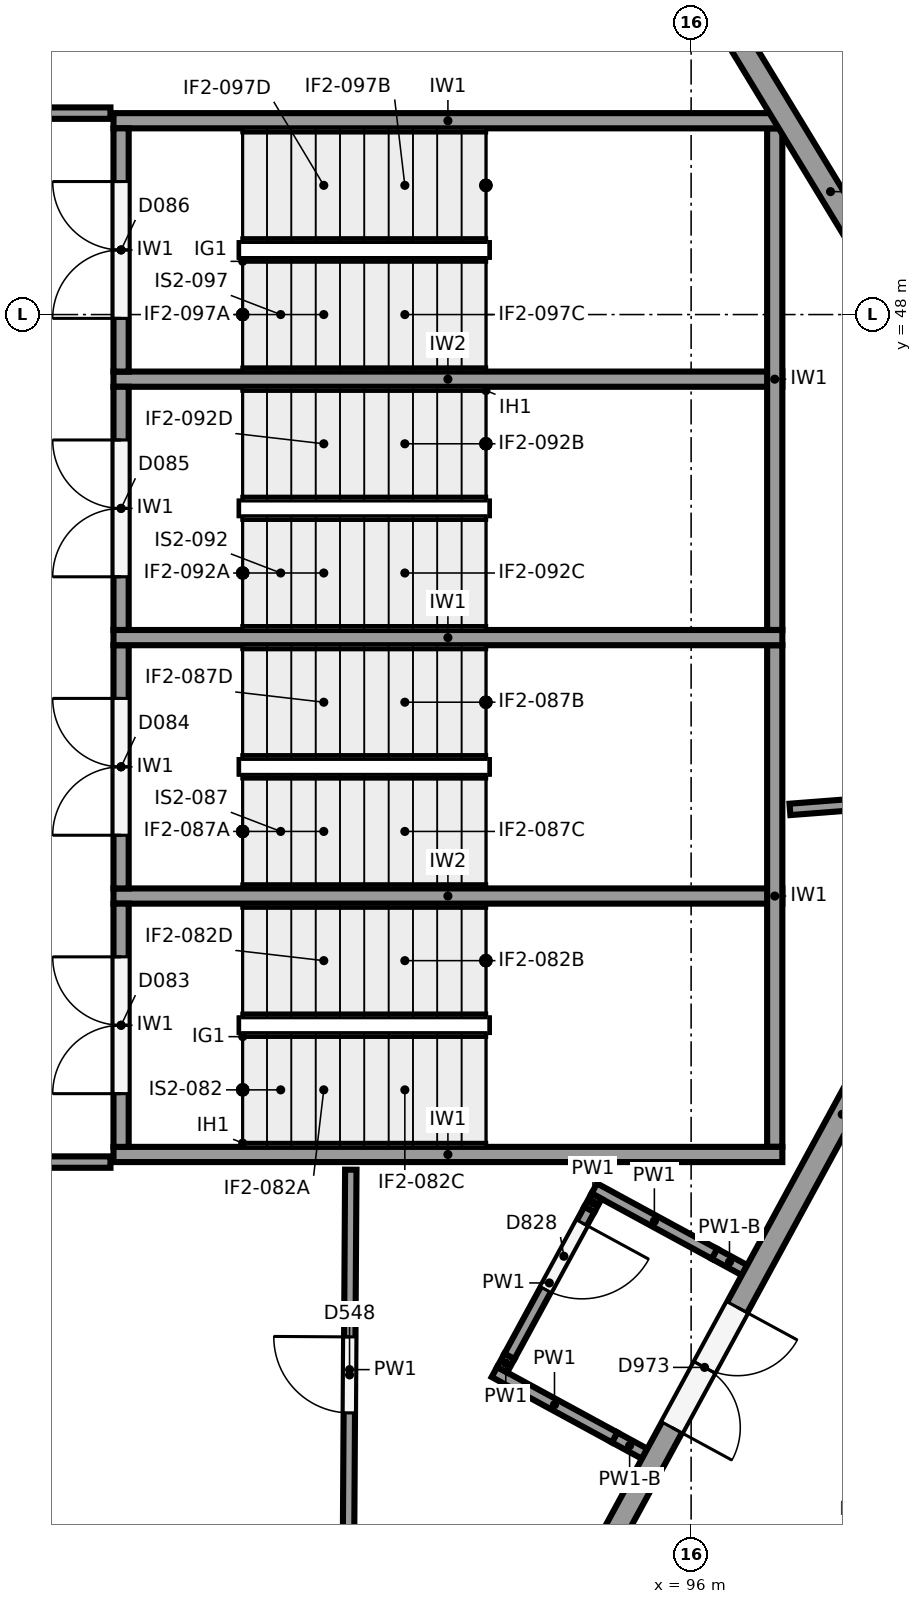
"""IFC4 building model, lengths in metres.
Left out: names, types, materials, properties, quantities, classifications, styles, units other than length and angle.
Written with IfcOpenShell. Run it as: python <this file> out.ifc"""

import sys

from ifc_helpers import new_model, si_unit, direction, frame, frame_2d, origin, place, context, subcontext, project, spatial, rectangle, extrude, element, fill, save


model = new_model("IFC4")
c1 = context("Model", 3, precision=1e-05, world=origin(), true_north=direction((0.0, 1.0)))
c2 = subcontext(c1, "Body", "Model", "MODEL_VIEW")
j1 = project(units=[si_unit("LENGTHUNIT", "METRE"), si_unit("PLANEANGLEUNIT", "RADIAN")], contexts=[c1])
p1 = place(None, origin())
s1 = spatial("IfcSite", under=j1, at=p1, CompositionType="ELEMENT")
p2 = place(p1, origin())
s2 = spatial("IfcBuilding", under=s1, at=p2, CompositionType="ELEMENT")
p3 = place(p2, origin())
s3 = spatial("IfcBuildingStorey", under=s2, at=p3, CompositionType="ELEMENT", Elevation=0.0)
p4 = place(p3, frame((101.161, 43.311, 0.0), z_axis=(0.0, 0.0, 1.0), x_axis=(-0.477867771117, -0.878431780691, 0.0)))
e1 = element("IfcWall", 1, at=p4, inside=s3, PredefinedType="SOLIDWALL", context=c2, shape_type="SweptSolid", body=[
    extrude(rectangle(XDim=13.28, YDim=0.3, at=frame_2d((6.64, 0.0))), origin(), (0.0, 0.0, 1.0), 4.85),
])
p5 = place(p4, frame((9.53, 0.0, 0.0)))
e2 = element("IfcOpeningElement", 2, at=p5, cuts=e1, PredefinedType="OPENING", context=c2, shape_type="SweptSolid", body=[
    extrude(rectangle(XDim=1.8, YDim=2.4, at=frame_2d((0.9, 1.2))), frame((0.0, 0.16, 0.0), z_axis=(0.0, -1.0, 0.0), x_axis=(1.0, 0.0, 0.0)), (0.0, 0.0, 1.0), 0.32),
])
p6 = place(p3, frame((94.528, 55.057, 0.0), z_axis=(0.0, 0.0, 1.0), x_axis=(0.519362860044, -0.854553813172, 0.0)))
e3 = element("IfcWall", 3, at=p6, inside=s3, PredefinedType="SOLIDWALL", context=c2, shape_type="SweptSolid", body=[
    extrude(rectangle(XDim=12.732, YDim=0.3, at=frame_2d((6.366, 0.0))), origin(), (0.0, 0.0, 1.0), 4.85),
])
for number, where, z_axis, x_axis in (
    (4, (97.2, 36.95, 0.0), (0.0, 0.0, 1.0), (-1.0, 0.0, 0.0)),
    (5, (97.2, 43.75, 0.0), (0.0, 0.0, 1.0), (-1.0, 0.0, 0.0)),
    (6, (97.2, 50.55, 0.0), (0.0, 0.0, 1.0), (-1.0, 0.0, 0.0)),
):
    element("IfcWall", number, at=place(p3, frame(where, z_axis=z_axis, x_axis=x_axis)), inside=s3, PredefinedType="SHEAR", context=c2, shape_type="SweptSolid", body=[
        extrude(rectangle(XDim=8.8, YDim=0.2, at=frame_2d((4.4, 0.0))), origin(), (0.0, 0.0, 1.0), 6.15),
    ])
for number, where, z_axis, x_axis in (
    (7, (97.1, 37.05, 0.0), (0.0, 0.0, 1.0), (0.0, 1.0, 0.0)),
    (8, (97.1, 43.85, 0.0), (0.0, 0.0, 1.0), (0.0, 1.0, 0.0)),
):
    element("IfcWall", number, at=place(p3, frame(where, z_axis=z_axis, x_axis=x_axis)), inside=s3, PredefinedType="SHEAR", context=c2, shape_type="SweptSolid", body=[
        extrude(rectangle(XDim=6.6, YDim=0.2, at=frame_2d((3.3, 0.0))), origin(), (0.0, 0.0, 1.0), 6.15),
    ])
for number, where, z_axis, x_axis in (
    (9, (97.2, 40.35, 0.0), (0.0, 0.0, 1.0), (-1.0, 0.0, 0.0)),
    (10, (97.2, 47.15, 0.0), (0.0, 0.0, 1.0), (-1.0, 0.0, 0.0)),
):
    element("IfcWall", number, at=place(p3, frame(where, z_axis=z_axis, x_axis=x_axis)), inside=s3, PredefinedType="SHEAR", context=c2, shape_type="SweptSolid", body=[
        extrude(rectangle(XDim=8.8, YDim=0.2, at=frame_2d((4.4, 0.0))), origin(), (0.0, 0.0, 1.0), 6.15),
    ])
p7 = place(p3, frame((88.5, 37.05, 0.0), z_axis=(0.0, 0.0, 1.0), x_axis=(0.0, 1.0, 0.0)))
e11 = element("IfcWall", 11, at=p7, inside=s3, PredefinedType="SHEAR", context=c2, shape_type="SweptSolid", body=[
    extrude(rectangle(XDim=3.2, YDim=0.2, at=frame_2d((1.6, 0.0))), origin(), (0.0, 0.0, 1.0), 6.15),
])
p8 = place(p7, frame((0.7, 0.0, 0.0)))
e12 = element("IfcOpeningElement", 12, at=p8, cuts=e11, PredefinedType="OPENING", context=c2, shape_type="SweptSolid", body=[
    extrude(rectangle(XDim=1.8, YDim=2.1, at=frame_2d((0.9, 1.05))), frame((0.0, 0.11, 0.0), z_axis=(0.0, -1.0, 0.0), x_axis=(1.0, 0.0, 0.0)), (0.0, 0.0, 1.0), 0.22),
])
p9 = place(p3, frame((88.5, 40.45, 0.0), z_axis=(0.0, 0.0, 1.0), x_axis=(0.0, 1.0, 0.0)))
e13 = element("IfcWall", 13, at=p9, inside=s3, PredefinedType="SHEAR", context=c2, shape_type="SweptSolid", body=[
    extrude(rectangle(XDim=3.2, YDim=0.2, at=frame_2d((1.6, 0.0))), origin(), (0.0, 0.0, 1.0), 6.15),
])
p10 = place(p9, frame((0.7, 0.0, 0.0)))
e14 = element("IfcOpeningElement", 14, at=p10, cuts=e13, PredefinedType="OPENING", context=c2, shape_type="SweptSolid", body=[
    extrude(rectangle(XDim=1.8, YDim=2.1, at=frame_2d((0.9, 1.05))), frame((0.0, 0.11, 0.0), z_axis=(0.0, -1.0, 0.0), x_axis=(1.0, 0.0, 0.0)), (0.0, 0.0, 1.0), 0.22),
])
p11 = place(p3, frame((88.5, 43.85, 0.0), z_axis=(0.0, 0.0, 1.0), x_axis=(0.0, 1.0, 0.0)))
e15 = element("IfcWall", 15, at=p11, inside=s3, PredefinedType="SHEAR", context=c2, shape_type="SweptSolid", body=[
    extrude(rectangle(XDim=3.2, YDim=0.2, at=frame_2d((1.6, 0.0))), origin(), (0.0, 0.0, 1.0), 6.15),
])
p12 = place(p11, frame((0.7, 0.0, 0.0)))
e16 = element("IfcOpeningElement", 16, at=p12, cuts=e15, PredefinedType="OPENING", context=c2, shape_type="SweptSolid", body=[
    extrude(rectangle(XDim=1.8, YDim=2.1, at=frame_2d((0.9, 1.05))), frame((0.0, 0.11, 0.0), z_axis=(0.0, -1.0, 0.0), x_axis=(1.0, 0.0, 0.0)), (0.0, 0.0, 1.0), 0.22),
])
p13 = place(p3, frame((88.5, 47.25, 0.0), z_axis=(0.0, 0.0, 1.0), x_axis=(0.0, 1.0, 0.0)))
e17 = element("IfcWall", 17, at=p13, inside=s3, PredefinedType="SHEAR", context=c2, shape_type="SweptSolid", body=[
    extrude(rectangle(XDim=3.2, YDim=0.2, at=frame_2d((1.6, 0.0))), origin(), (0.0, 0.0, 1.0), 6.15),
])
p14 = place(p13, frame((0.7, 0.0, 0.0)))
e18 = element("IfcOpeningElement", 18, at=p14, cuts=e17, PredefinedType="OPENING", context=c2, shape_type="SweptSolid", body=[
    extrude(rectangle(XDim=1.8, YDim=2.1, at=frame_2d((0.9, 1.05))), frame((0.0, 0.11, 0.0), z_axis=(0.0, -1.0, 0.0), x_axis=(1.0, 0.0, 0.0)), (0.0, 0.0, 1.0), 0.22),
])
p15 = place(p3, frame((85.377, 36.85, 0.0), z_axis=(0.0, 0.0, 1.0), x_axis=(1.0, 0.0, 0.0)))
e19 = element("IfcWall", 19, at=p15, inside=s3, PredefinedType="PARTITIONING", context=c2, shape_type="SweptSolid", body=[
    extrude(rectangle(XDim=2.983, YDim=0.15, at=frame_2d((1.491, 0.0))), origin(), (0.0, 0.0, 1.0), 6.15),
])
p16 = place(p3, frame((91.49, 31.489, 0.0), z_axis=(0.0, 0.0, 1.0), x_axis=(0.006125459352, 0.999981239198, 0.0)))
e20 = element("IfcWall", 20, at=p16, inside=s3, PredefinedType="PARTITIONING", context=c2, shape_type="SweptSolid", body=[
    extrude(rectangle(XDim=5.261, YDim=0.15, at=frame_2d((2.63, 0.0))), origin(), (0.0, 0.0, 1.0), 6.15),
])
p17 = place(p16, frame((2.061, 0.0, 0.0)))
e21 = element("IfcOpeningElement", 21, at=p17, cuts=e20, PredefinedType="OPENING", context=c2, shape_type="SweptSolid", body=[
    extrude(rectangle(XDim=1.0, YDim=2.1, at=frame_2d((0.5, 1.05))), frame((0.0, 0.085, 0.0), z_axis=(0.0, -1.0, 0.0), x_axis=(1.0, 0.0, 0.0)), (0.0, 0.0, 1.0), 0.17),
])
p18 = place(p3, frame((97.3, 41.49, 0.0), z_axis=(0.0, 0.0, 1.0), x_axis=(0.99706720675, 0.076530942913, 0.0)))
e22 = element("IfcWall", 22, at=p18, inside=s3, PredefinedType="PARTITIONING", context=c2, shape_type="SweptSolid", body=[
    extrude(rectangle(XDim=2.255, YDim=0.15, at=frame_2d((1.128, 0.0))), origin(), (0.0, 0.0, 1.0), 6.15),
])
p19 = place(p3, frame((88.36, 50.65, 0.0), z_axis=(0.0, 0.0, 1.0), x_axis=(-1.0, 0.0, 0.0)))
e23 = element("IfcWall", 23, at=p19, inside=s3, PredefinedType="PARTITIONING", context=c2, shape_type="SweptSolid", body=[
    extrude(rectangle(XDim=3.48, YDim=0.15, at=frame_2d((1.74, 0.0))), origin(), (0.0, 0.0, 1.0), 6.15),
])
p20 = place(p19, frame((0.95, 0.0, 0.0)))
e24 = element("IfcOpeningElement", 24, at=p20, cuts=e23, PredefinedType="OPENING", context=c2, shape_type="SweptSolid", body=[
    extrude(rectangle(XDim=1.8, YDim=2.1, at=frame_2d((0.9, 1.05))), frame((0.0, 0.085, 0.0), z_axis=(0.0, -1.0, 0.0), x_axis=(1.0, 0.0, 0.0)), (0.0, 0.0, 1.0), 0.17),
])
p21 = place(p3, frame((96.702, 35.428, 0.0), z_axis=(0.0, 0.0, 1.0), x_axis=(-0.878372019733, 0.477977609256, 0.0)))
e25 = element("IfcWall", 25, at=p21, inside=s3, PredefinedType="PARTITIONING", context=c2, shape_type="SweptSolid", body=[
    extrude(rectangle(XDim=0.45, YDim=0.15, at=frame_2d((0.225, 0.0))), origin(), (0.0, 0.0, 1.0), 4.85),
])
p22 = place(p3, frame((96.307, 35.643, 0.0), z_axis=(0.0, 0.0, 1.0), x_axis=(-0.878428962466, 0.477872951632, 0.0)))
e26 = element("IfcWall", 26, at=p22, inside=s3, PredefinedType="PARTITIONING", context=c2, shape_type="SweptSolid", body=[
    extrude(rectangle(XDim=1.8, YDim=0.15, at=frame_2d((0.9, 0.0))), origin(), (0.0, 0.0, 1.0), 6.15),
])
p23 = place(p3, frame((95.388, 33.013, 0.0), z_axis=(0.0, 0.0, 1.0), x_axis=(-0.878372019733, 0.477977609256, 0.0)))
e27 = element("IfcWall", 27, at=p23, inside=s3, PredefinedType="PARTITIONING", context=c2, shape_type="SweptSolid", body=[
    extrude(rectangle(XDim=0.45, YDim=0.15, at=frame_2d((0.225, 0.0))), origin(), (0.0, 0.0, 1.0), 4.85),
])
p24 = place(p3, frame((94.993, 33.228, 0.0), z_axis=(0.0, 0.0, 1.0), x_axis=(-0.878459932885, 0.477816017223, 0.0)))
e28 = element("IfcWall", 28, at=p24, inside=s3, PredefinedType="PARTITIONING", context=c2, shape_type="SweptSolid", body=[
    extrude(rectangle(XDim=1.8, YDim=0.15, at=frame_2d((0.9, 0.0))), origin(), (0.0, 0.0, 1.0), 6.15),
])
p25 = place(p3, frame((94.756, 36.402, 0.0), z_axis=(0.0, 0.0, 1.0), x_axis=(-0.478168266369, -0.878268244352, 0.0)))
e29 = element("IfcWall", 29, at=p25, inside=s3, PredefinedType="PARTITIONING", context=c2, shape_type="SweptSolid", body=[
    extrude(rectangle(XDim=0.2, YDim=0.15, at=frame_2d((0.1, 0.0))), origin(), (0.0, 0.0, 1.0), 6.15),
])
p26 = place(p3, frame((94.66, 36.226, 0.0), z_axis=(0.0, 0.0, 1.0), x_axis=(-0.477887643273, -0.878420969927, 0.0)))
e30 = element("IfcWall", 30, at=p26, inside=s3, PredefinedType="PARTITIONING", context=c2, shape_type="SweptSolid", body=[
    extrude(rectangle(XDim=2.2, YDim=0.15, at=frame_2d((1.1, 0.0))), origin(), (0.0, 0.0, 1.0), 6.15),
])
p27 = place(p26, frame((0.2, 0.0, 0.0)))
e31 = element("IfcOpeningElement", 31, at=p27, cuts=e30, PredefinedType="OPENING", context=c2, shape_type="SweptSolid", body=[
    extrude(rectangle(XDim=1.0, YDim=2.1, at=frame_2d((0.5, 1.05))), frame((0.0, 0.085, 0.0), z_axis=(0.0, -1.0, 0.0), x_axis=(1.0, 0.0, 0.0)), (0.0, 0.0, 1.0), 0.17),
])
p28 = place(p3, frame((93.609, 34.294, 0.0), z_axis=(0.0, 0.0, 1.0), x_axis=(-0.477226530971, -0.878780312785, 0.0)))
e32 = element("IfcWall", 32, at=p28, inside=s3, PredefinedType="PARTITIONING", context=c2, shape_type="SweptSolid", body=[
    extrude(rectangle(XDim=0.2, YDim=0.15, at=frame_2d((0.1, 0.0))), origin(), (0.0, 0.0, 1.0), 6.15),
])
p29 = place(p5, origin())
e33 = element("IfcDoor", 33, at=p29, inside=s3, OperationType="DOUBLE_DOOR_SINGLE_SWING", PredefinedType="DOOR", context=c2, shape_type="SweptSolid", body=[
    extrude(rectangle(XDim=1.8, YDim=2.4, at=frame_2d((0.9, 1.2))), frame((0.0, 0.025, 0.0), z_axis=(0.0, -1.0, 0.0), x_axis=(1.0, 0.0, 0.0)), (0.0, 0.0, 1.0), 0.05),
])
fill(e2, e33)
p30 = place(p8, origin())
e34 = element("IfcDoor", 34, at=p30, inside=s3, OperationType="DOUBLE_DOOR_SINGLE_SWING", PredefinedType="DOOR", context=c2, shape_type="SweptSolid", body=[
    extrude(rectangle(XDim=1.8, YDim=2.1, at=frame_2d((0.9, 1.05))), frame((0.0, 0.025, 0.0), z_axis=(0.0, -1.0, 0.0), x_axis=(1.0, 0.0, 0.0)), (0.0, 0.0, 1.0), 0.05),
])
fill(e12, e34)
p31 = place(p10, origin())
e35 = element("IfcDoor", 35, at=p31, inside=s3, OperationType="DOUBLE_DOOR_SINGLE_SWING", PredefinedType="DOOR", context=c2, shape_type="SweptSolid", body=[
    extrude(rectangle(XDim=1.8, YDim=2.1, at=frame_2d((0.9, 1.05))), frame((0.0, 0.025, 0.0), z_axis=(0.0, -1.0, 0.0), x_axis=(1.0, 0.0, 0.0)), (0.0, 0.0, 1.0), 0.05),
])
fill(e14, e35)
p32 = place(p12, origin())
e36 = element("IfcDoor", 36, at=p32, inside=s3, OperationType="DOUBLE_DOOR_SINGLE_SWING", PredefinedType="DOOR", context=c2, shape_type="SweptSolid", body=[
    extrude(rectangle(XDim=1.8, YDim=2.1, at=frame_2d((0.9, 1.05))), frame((0.0, 0.025, 0.0), z_axis=(0.0, -1.0, 0.0), x_axis=(1.0, 0.0, 0.0)), (0.0, 0.0, 1.0), 0.05),
])
fill(e16, e36)
p33 = place(p14, origin())
e37 = element("IfcDoor", 37, at=p33, inside=s3, OperationType="DOUBLE_DOOR_SINGLE_SWING", PredefinedType="DOOR", context=c2, shape_type="SweptSolid", body=[
    extrude(rectangle(XDim=1.8, YDim=2.1, at=frame_2d((0.9, 1.05))), frame((0.0, 0.025, 0.0), z_axis=(0.0, -1.0, 0.0), x_axis=(1.0, 0.0, 0.0)), (0.0, 0.0, 1.0), 0.05),
])
fill(e18, e37)
p34 = place(p17, origin())
e38 = element("IfcDoor", 38, at=p34, inside=s3, OperationType="SINGLE_SWING_RIGHT", PredefinedType="DOOR", context=c2, shape_type="SweptSolid", body=[
    extrude(rectangle(XDim=1.0, YDim=2.1, at=frame_2d((0.5, 1.05))), frame((0.0, 0.025, 0.0), z_axis=(0.0, -1.0, 0.0), x_axis=(1.0, 0.0, 0.0)), (0.0, 0.0, 1.0), 0.05),
])
fill(e21, e38)
p35 = place(p27, origin())
e39 = element("IfcDoor", 39, at=p35, inside=s3, OperationType="SINGLE_SWING_LEFT", PredefinedType="DOOR", context=c2, shape_type="SweptSolid", body=[
    extrude(rectangle(XDim=1.0, YDim=2.1, at=frame_2d((0.5, 1.05))), frame((0.0, 0.025, 0.0), z_axis=(0.0, -1.0, 0.0), x_axis=(1.0, 0.0, 0.0)), (0.0, 0.0, 1.0), 0.05),
])
fill(e31, e39)
save(model, sys.argv[1])
